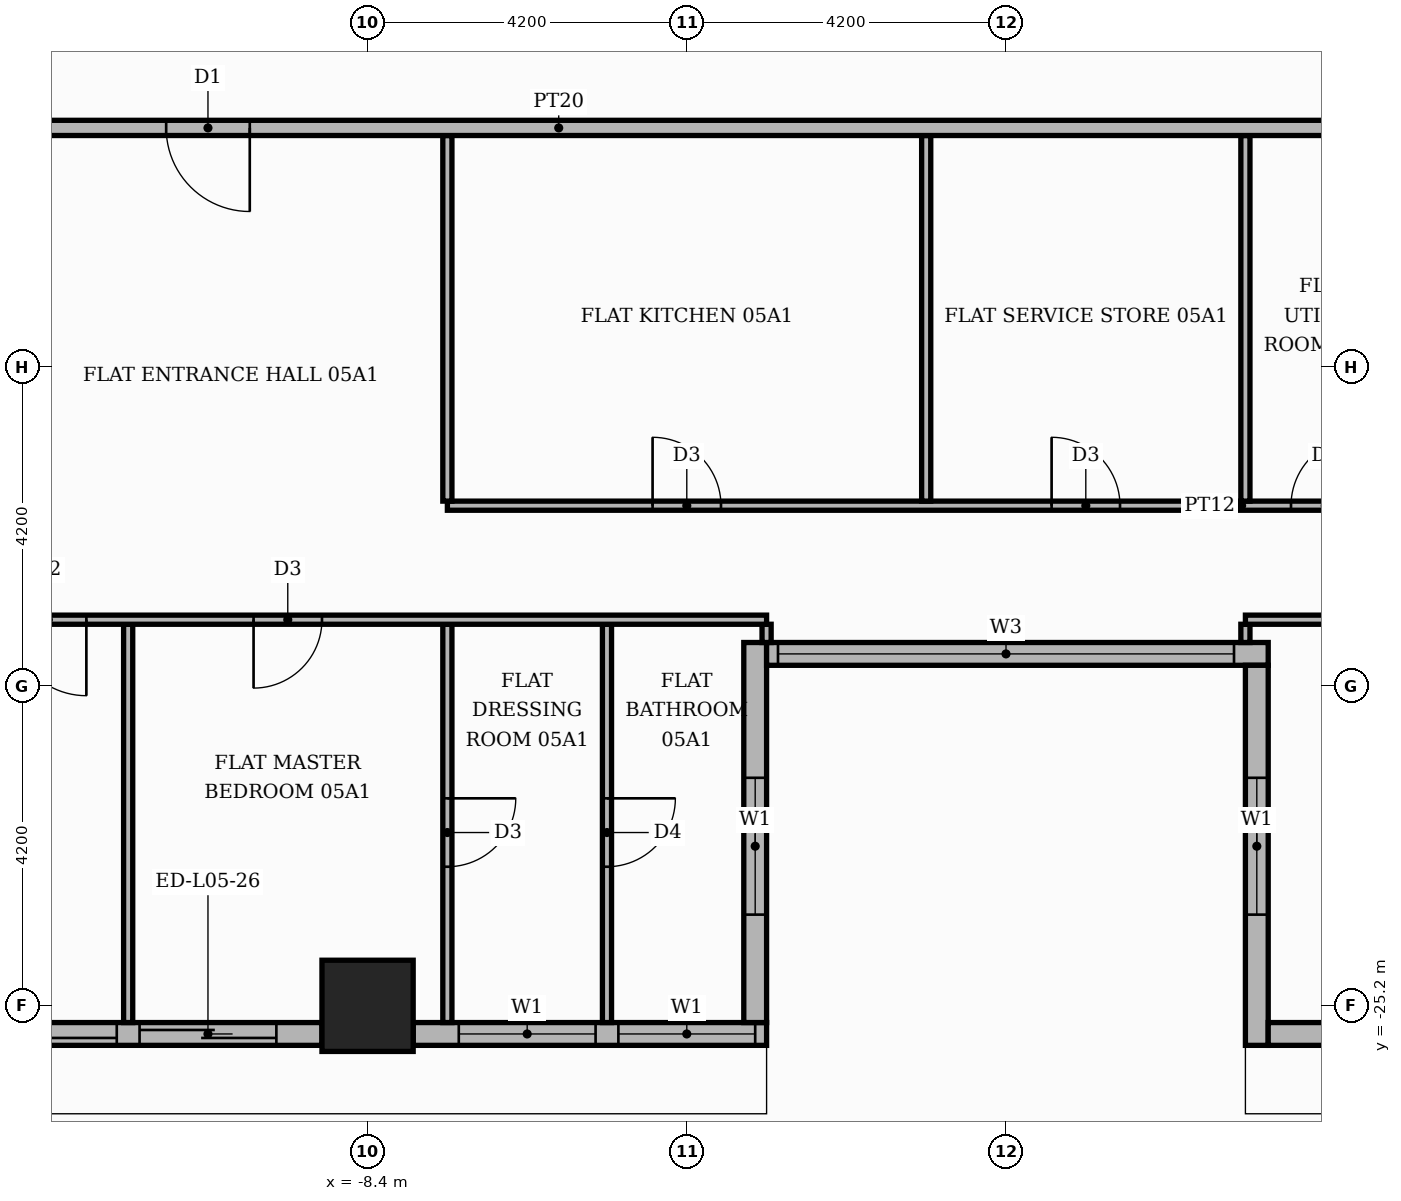
"""IFC4 building model, lengths in metres.
Left out: names, types, materials, properties, quantities, classifications, styles, units other than length and angle.
Written with IfcOpenShell. Run it as: python <this file> out.ifc"""

import sys

from ifc_helpers import new_model, si_unit, direction, frame, frame_2d, origin, origin_2d, place, context, subcontext, project, spatial, rectangle, extrude, element, fill, save


model = new_model("IFC4")
c1 = context("Model", 3, precision=1e-05, world=origin(), true_north=direction((0.0, 1.0)))
c2 = subcontext(c1, "Body", "Model", "MODEL_VIEW")
j1 = project(units=[si_unit("LENGTHUNIT", "METRE"), si_unit("PLANEANGLEUNIT", "RADIAN")], contexts=[c1])
p1 = place(None, origin())
s1 = spatial("IfcSite", under=j1, at=p1, CompositionType="ELEMENT")
p2 = place(p1, origin())
s2 = spatial("IfcBuilding", under=s1, at=p2, CompositionType="ELEMENT")
p3 = place(p2, frame((0.0, 0.0, 27.0)))
s3 = spatial("IfcBuildingStorey", under=s2, at=p3, CompositionType="ELEMENT", Elevation=27.0)
p4 = place(p3, frame((-8.4, -25.2, 0.0), z_axis=(0.0, 0.0, 1.0), x_axis=(1.0, 0.0, 0.0)))
e1 = element("IfcColumn", 1, at=p4, inside=s3, PredefinedType="COLUMN", context=c2, shape_type="SweptSolid", body=[
    extrude(rectangle(XDim=1.2, YDim=1.2, at=origin_2d()), origin(), (0.0, 0.0, 1.0), 3.9),
])
p5 = place(p3, frame((-16.2, -25.57, 0.0), z_axis=(0.0, 0.0, 1.0), x_axis=(1.0, 0.0, 0.0)))
e2 = element("IfcWall", 2, at=p5, inside=s3, PredefinedType="STANDARD", context=c2, shape_type="SweptSolid", body=[
    extrude(rectangle(XDim=7.2, YDim=0.3, at=frame_2d((3.6, 0.0))), origin(), (0.0, 0.0, 1.0), 3.48),
])
p6 = place(p5, frame((0.6, 0.0, 0.0)))
e3 = element("IfcOpeningElement", 3, at=p6, cuts=e2, PredefinedType="OPENING", context=c2, shape_type="SweptSolid", body=[
    extrude(rectangle(XDim=3.9, YDim=2.4, at=frame_2d((1.95, 1.2))), frame((0.0, 0.16, 0.0), z_axis=(0.0, -1.0, 0.0), x_axis=(1.0, 0.0, 0.0)), (0.0, 0.0, 1.0), 0.32),
])
p7 = place(p5, frame((4.8, 0.0, 0.0)))
e4 = element("IfcOpeningElement", 4, at=p7, cuts=e2, PredefinedType="OPENING", context=c2, shape_type="SweptSolid", body=[
    extrude(rectangle(XDim=1.8, YDim=2.4, at=frame_2d((0.9, 1.2))), frame((0.0, 0.16, 0.0), z_axis=(0.0, -1.0, 0.0), x_axis=(1.0, 0.0, 0.0)), (0.0, 0.0, 1.0), 0.32),
])
p8 = place(p3, frame((-7.8, -25.57, 0.0), z_axis=(0.0, 0.0, 1.0), x_axis=(1.0, 0.0, 0.0)))
e5 = element("IfcWall", 5, at=p8, inside=s3, PredefinedType="STANDARD", context=c2, shape_type="SweptSolid", body=[
    extrude(rectangle(XDim=4.65, YDim=0.3, at=frame_2d((2.325, 0.0))), origin(), (0.0, 0.0, 1.0), 3.48),
])
p9 = place(p8, frame((0.6, 0.0, 0.9)))
e6 = element("IfcOpeningElement", 6, at=p9, cuts=e5, PredefinedType="OPENING", context=c2, shape_type="SweptSolid", body=[
    extrude(rectangle(XDim=1.8, YDim=2.1, at=frame_2d((0.9, 1.05))), frame((0.0, 0.16, 0.0), z_axis=(0.0, -1.0, 0.0), x_axis=(1.0, 0.0, 0.0)), (0.0, 0.0, 1.0), 0.32),
])
p10 = place(p8, frame((2.7, 0.0, 0.9)))
e7 = element("IfcOpeningElement", 7, at=p10, cuts=e5, PredefinedType="OPENING", context=c2, shape_type="SweptSolid", body=[
    extrude(rectangle(XDim=1.8, YDim=2.1, at=frame_2d((0.9, 1.05))), frame((0.0, 0.16, 0.0), z_axis=(0.0, -1.0, 0.0), x_axis=(1.0, 0.0, 0.0)), (0.0, 0.0, 1.0), 0.32),
])
p11 = place(p3, frame((-3.3, -25.42, 0.0), z_axis=(0.0, 0.0, 1.0), x_axis=(0.0, 1.0, 0.0)))
e8 = element("IfcWall", 8, at=p11, inside=s3, PredefinedType="STANDARD", context=c2, shape_type="SweptSolid", body=[
    extrude(rectangle(XDim=5.0, YDim=0.3, at=frame_2d((2.5, 0.0))), origin(), (0.0, 0.0, 1.0), 3.48),
])
p12 = place(p11, frame((1.42, 0.0, 0.9)))
e9 = element("IfcOpeningElement", 9, at=p12, cuts=e8, PredefinedType="OPENING", context=c2, shape_type="SweptSolid", body=[
    extrude(rectangle(XDim=1.8, YDim=2.1, at=frame_2d((0.9, 1.05))), frame((0.0, 0.16, 0.0), z_axis=(0.0, -1.0, 0.0), x_axis=(1.0, 0.0, 0.0)), (0.0, 0.0, 1.0), 0.32),
])
p13 = place(p3, frame((-3.15, -20.57, 0.0), z_axis=(0.0, 0.0, 1.0), x_axis=(1.0, 0.0, 0.0)))
e10 = element("IfcWall", 10, at=p13, inside=s3, PredefinedType="STANDARD", context=c2, shape_type="SweptSolid", body=[
    extrude(rectangle(XDim=6.6, YDim=0.3, at=frame_2d((3.3, 0.0))), origin(), (0.0, 0.0, 1.0), 3.48),
])
p14 = place(p13, frame((0.15, 0.0, 0.9)))
e11 = element("IfcOpeningElement", 11, at=p14, cuts=e10, PredefinedType="OPENING", context=c2, shape_type="SweptSolid", body=[
    extrude(rectangle(XDim=6.0, YDim=2.1, at=frame_2d((3.0, 1.05))), frame((0.0, 0.16, 0.0), z_axis=(0.0, -1.0, 0.0), x_axis=(1.0, 0.0, 0.0)), (0.0, 0.0, 1.0), 0.32),
])
p15 = place(p3, frame((3.3, -20.72, 0.0), z_axis=(0.0, 0.0, 1.0), x_axis=(0.0, -1.0, 0.0)))
e12 = element("IfcWall", 12, at=p15, inside=s3, PredefinedType="STANDARD", context=c2, shape_type="SweptSolid", body=[
    extrude(rectangle(XDim=5.0, YDim=0.3, at=frame_2d((2.5, 0.0))), origin(), (0.0, 0.0, 1.0), 3.48),
])
p16 = place(p15, frame((1.48, 0.0, 0.9)))
e13 = element("IfcOpeningElement", 13, at=p16, cuts=e12, PredefinedType="OPENING", context=c2, shape_type="SweptSolid", body=[
    extrude(rectangle(XDim=1.8, YDim=2.1, at=frame_2d((0.9, 1.05))), frame((0.0, 0.16, 0.0), z_axis=(0.0, -1.0, 0.0), x_axis=(1.0, 0.0, 0.0)), (0.0, 0.0, 1.0), 0.32),
])
p17 = place(p3, frame((3.45, -25.57, 0.0), z_axis=(0.0, 0.0, 1.0), x_axis=(1.0, 0.0, 0.0)))
e14 = element("IfcWall", 14, at=p17, inside=s3, PredefinedType="STANDARD", context=c2, shape_type="SweptSolid", body=[
    extrude(rectangle(XDim=4.35, YDim=0.3, at=frame_2d((2.175, 0.0))), origin(), (0.0, 0.0, 1.0), 3.48),
])
p18 = place(p17, frame((1.95, 0.0, 0.9)))
e15 = element("IfcOpeningElement", 15, at=p18, cuts=e14, PredefinedType="OPENING", context=c2, shape_type="SweptSolid", body=[
    extrude(rectangle(XDim=1.8, YDim=2.1, at=frame_2d((0.9, 1.05))), frame((0.0, 0.16, 0.0), z_axis=(0.0, -1.0, 0.0), x_axis=(1.0, 0.0, 0.0)), (0.0, 0.0, 1.0), 0.32),
])
p19 = place(p3, frame((-11.55, -25.42, 0.0), z_axis=(0.0, 0.0, 1.0), x_axis=(0.0, 1.0, 0.0)))
e16 = element("IfcWall", 16, at=p19, inside=s3, PredefinedType="PARTITIONING", context=c2, shape_type="SweptSolid", body=[
    extrude(rectangle(XDim=5.24, YDim=0.12, at=frame_2d((2.62, 0.0))), origin(), (0.0, 0.0, 1.0), 3.48),
])
p20 = place(p3, frame((-7.35, -25.42, 0.0), z_axis=(0.0, 0.0, 1.0), x_axis=(0.0, 1.0, 0.0)))
e17 = element("IfcWall", 17, at=p20, inside=s3, PredefinedType="PARTITIONING", context=c2, shape_type="SweptSolid", body=[
    extrude(rectangle(XDim=5.24, YDim=0.12, at=frame_2d((2.62, 0.0))), origin(), (0.0, 0.0, 1.0), 3.48),
])
p21 = place(p20, frame((2.05, 0.0, 0.0)))
e18 = element("IfcOpeningElement", 18, at=p21, cuts=e17, PredefinedType="OPENING", context=c2, shape_type="SweptSolid", body=[
    extrude(rectangle(XDim=0.9, YDim=2.1, at=frame_2d((0.45, 1.05))), frame((0.0, 0.07, 0.0), z_axis=(0.0, -1.0, 0.0), x_axis=(1.0, 0.0, 0.0)), (0.0, 0.0, 1.0), 0.14),
])
p22 = place(p3, frame((-5.25, -25.42, 0.0), z_axis=(0.0, 0.0, 1.0), x_axis=(0.0, 1.0, 0.0)))
e19 = element("IfcWall", 19, at=p22, inside=s3, PredefinedType="PARTITIONING", context=c2, shape_type="SweptSolid", body=[
    extrude(rectangle(XDim=5.24, YDim=0.12, at=frame_2d((2.62, 0.0))), origin(), (0.0, 0.0, 1.0), 3.48),
])
p23 = place(p22, frame((2.05, 0.0, 0.0)))
e20 = element("IfcOpeningElement", 20, at=p23, cuts=e19, PredefinedType="OPENING", context=c2, shape_type="SweptSolid", body=[
    extrude(rectangle(XDim=0.9, YDim=2.1, at=frame_2d((0.45, 1.05))), frame((0.0, 0.07, 0.0), z_axis=(0.0, -1.0, 0.0), x_axis=(1.0, 0.0, 0.0)), (0.0, 0.0, 1.0), 0.14),
])
for number, where, z_axis, x_axis in (
    (21, (-3.15, -20.42, 0.0), (0.0, 0.0, 1.0), (0.0, 1.0, 0.0)),
    (22, (3.15, -20.42, 0.0), (0.0, 0.0, 1.0), (0.0, 1.0, 0.0)),
):
    element("IfcWall", number, at=place(p3, frame(where, z_axis=z_axis, x_axis=x_axis)), inside=s3, PredefinedType="PARTITIONING", context=c2, shape_type="SweptSolid", body=[
        extrude(rectangle(XDim=0.24, YDim=0.12, at=frame_2d((0.12, 0.0))), origin(), (0.0, 0.0, 1.0), 3.48),
    ])
p24 = place(p3, frame((-17.3, -20.12, 0.0), z_axis=(0.0, 0.0, 1.0), x_axis=(1.0, 0.0, 0.0)))
e23 = element("IfcWall", 23, at=p24, inside=s3, PredefinedType="PARTITIONING", context=c2, shape_type="SweptSolid", body=[
    extrude(rectangle(XDim=14.15, YDim=0.12, at=frame_2d((7.075, 0.0))), origin(), (0.0, 0.0, 1.0), 3.48),
])
p25 = place(p24, frame((4.2, 0.0, 0.0)))
e24 = element("IfcOpeningElement", 24, at=p25, cuts=e23, PredefinedType="OPENING", context=c2, shape_type="SweptSolid", body=[
    extrude(rectangle(XDim=1.0, YDim=2.1, at=frame_2d((0.5, 1.05))), frame((0.0, 0.07, 0.0), z_axis=(0.0, -1.0, 0.0), x_axis=(1.0, 0.0, 0.0)), (0.0, 0.0, 1.0), 0.14),
])
p26 = place(p24, frame((7.4, 0.0, 0.0)))
e25 = element("IfcOpeningElement", 25, at=p26, cuts=e23, PredefinedType="OPENING", context=c2, shape_type="SweptSolid", body=[
    extrude(rectangle(XDim=0.9, YDim=2.1, at=frame_2d((0.45, 1.05))), frame((0.0, 0.07, 0.0), z_axis=(0.0, -1.0, 0.0), x_axis=(1.0, 0.0, 0.0)), (0.0, 0.0, 1.0), 0.14),
])
p27 = place(p3, frame((3.15, -20.12, 0.0), z_axis=(0.0, 0.0, 1.0), x_axis=(1.0, 0.0, 0.0)))
e26 = element("IfcWall", 26, at=p27, inside=s3, PredefinedType="PARTITIONING", context=c2, shape_type="SweptSolid", body=[
    extrude(rectangle(XDim=10.4, YDim=0.12, at=frame_2d((5.2, 0.0))), origin(), (0.0, 0.0, 1.0), 3.48),
])
p28 = place(p27, frame((4.8, 0.0, 0.0)))
e27 = element("IfcOpeningElement", 27, at=p28, cuts=e26, PredefinedType="OPENING", context=c2, shape_type="SweptSolid", body=[
    extrude(rectangle(XDim=0.9, YDim=2.1, at=frame_2d((0.45, 1.05))), frame((0.0, 0.07, 0.0), z_axis=(0.0, -1.0, 0.0), x_axis=(1.0, 0.0, 0.0)), (0.0, 0.0, 1.0), 0.14),
])
p29 = place(p3, frame((-7.35, -18.62, 0.0), z_axis=(0.0, 0.0, 1.0), x_axis=(1.0, 0.0, 0.0)))
e28 = element("IfcWall", 28, at=p29, inside=s3, PredefinedType="PARTITIONING", context=c2, shape_type="SweptSolid", body=[
    extrude(rectangle(XDim=20.9, YDim=0.12, at=frame_2d((10.45, 0.0))), origin(), (0.0, 0.0, 1.0), 3.48),
])
p30 = place(p29, frame((2.7, 0.0, 0.0)))
e29 = element("IfcOpeningElement", 29, at=p30, cuts=e28, PredefinedType="OPENING", context=c2, shape_type="SweptSolid", body=[
    extrude(rectangle(XDim=0.9, YDim=2.1, at=frame_2d((0.45, 1.05))), frame((0.0, 0.07, 0.0), z_axis=(0.0, -1.0, 0.0), x_axis=(1.0, 0.0, 0.0)), (0.0, 0.0, 1.0), 0.14),
])
p31 = place(p29, frame((7.95, 0.0, 0.0)))
e30 = element("IfcOpeningElement", 30, at=p31, cuts=e28, PredefinedType="OPENING", context=c2, shape_type="SweptSolid", body=[
    extrude(rectangle(XDim=0.9, YDim=2.1, at=frame_2d((0.45, 1.05))), frame((0.0, 0.07, 0.0), z_axis=(0.0, -1.0, 0.0), x_axis=(1.0, 0.0, 0.0)), (0.0, 0.0, 1.0), 0.14),
])
p32 = place(p29, frame((11.1, 0.0, 0.0)))
e31 = element("IfcOpeningElement", 31, at=p32, cuts=e28, PredefinedType="OPENING", context=c2, shape_type="SweptSolid", body=[
    extrude(rectangle(XDim=0.9, YDim=2.1, at=frame_2d((0.45, 1.05))), frame((0.0, 0.07, 0.0), z_axis=(0.0, -1.0, 0.0), x_axis=(1.0, 0.0, 0.0)), (0.0, 0.0, 1.0), 0.14),
])
p33 = place(p29, frame((13.275, 0.0, 0.0)))
e32 = element("IfcOpeningElement", 32, at=p33, cuts=e28, PredefinedType="OPENING", context=c2, shape_type="SweptSolid", body=[
    extrude(rectangle(XDim=0.9, YDim=2.1, at=frame_2d((0.45, 1.05))), frame((0.0, 0.07, 0.0), z_axis=(0.0, -1.0, 0.0), x_axis=(1.0, 0.0, 0.0)), (0.0, 0.0, 1.0), 0.14),
])
p34 = place(p29, frame((15.3, 0.0, 0.0)))
e33 = element("IfcOpeningElement", 33, at=p34, cuts=e28, PredefinedType="OPENING", context=c2, shape_type="SweptSolid", body=[
    extrude(rectangle(XDim=0.9, YDim=2.1, at=frame_2d((0.45, 1.05))), frame((0.0, 0.07, 0.0), z_axis=(0.0, -1.0, 0.0), x_axis=(1.0, 0.0, 0.0)), (0.0, 0.0, 1.0), 0.14),
])
p35 = place(p29, frame((18.375, 0.0, 0.0)))
e34 = element("IfcOpeningElement", 34, at=p35, cuts=e28, PredefinedType="OPENING", context=c2, shape_type="SweptSolid", body=[
    extrude(rectangle(XDim=0.9, YDim=2.1, at=frame_2d((0.45, 1.05))), frame((0.0, 0.07, 0.0), z_axis=(0.0, -1.0, 0.0), x_axis=(1.0, 0.0, 0.0)), (0.0, 0.0, 1.0), 0.14),
])
for number, where, z_axis, x_axis in (
    (35, (-7.35, -18.56, 0.0), (0.0, 0.0, 1.0), (0.0, 1.0, 0.0)),
    (36, (-1.05, -18.56, 0.0), (0.0, 0.0, 1.0), (0.0, 1.0, 0.0)),
    (37, (3.15, -18.56, 0.0), (0.0, 0.0, 1.0), (0.0, 1.0, 0.0)),
):
    element("IfcWall", number, at=place(p3, frame(where, z_axis=z_axis, x_axis=x_axis)), inside=s3, PredefinedType="PARTITIONING", context=c2, shape_type="SweptSolid", body=[
        extrude(rectangle(XDim=4.81, YDim=0.12, at=frame_2d((2.405, 0.0))), origin(), (0.0, 0.0, 1.0), 3.48),
    ])
p36 = place(p3, frame((-25.42, -13.65, 0.0), z_axis=(0.0, 0.0, 1.0), x_axis=(1.0, 0.0, 0.0)))
e38 = element("IfcWall", 38, at=p36, inside=s3, PredefinedType="PARTITIONING", context=c2, shape_type="SweptSolid", body=[
    extrude(rectangle(XDim=39.07, YDim=0.2, at=frame_2d((19.535, 0.0))), origin(), (0.0, 0.0, 1.0), 3.48),
])
p37 = place(p36, frame((14.37, 0.0, 0.0)))
e39 = element("IfcOpeningElement", 39, at=p37, cuts=e38, PredefinedType="OPENING", context=c2, shape_type="SweptSolid", body=[
    extrude(rectangle(XDim=1.1, YDim=2.4, at=frame_2d((0.55, 1.2))), frame((0.0, 0.11, 0.0), z_axis=(0.0, -1.0, 0.0), x_axis=(1.0, 0.0, 0.0)), (0.0, 0.0, 1.0), 0.22),
])
p38 = place(p6, origin())
e40 = element("IfcDoor", 40, at=p38, inside=s3, OperationType="SLIDING_TO_LEFT", PredefinedType="DOOR", context=c2, shape_type="SweptSolid", body=[
    extrude(rectangle(XDim=3.9, YDim=2.4, at=frame_2d((1.95, 1.2))), frame((0.0, 0.025, 0.0), z_axis=(0.0, -1.0, 0.0), x_axis=(1.0, 0.0, 0.0)), (0.0, 0.0, 1.0), 0.05),
])
fill(e3, e40)
p39 = place(p7, origin())
e41 = element("IfcDoor", 41, at=p39, inside=s3, OperationType="SLIDING_TO_RIGHT", PredefinedType="DOOR", context=c2, shape_type="SweptSolid", body=[
    extrude(rectangle(XDim=1.8, YDim=2.4, at=frame_2d((0.9, 1.2))), frame((0.0, 0.025, 0.0), z_axis=(0.0, -1.0, 0.0), x_axis=(1.0, 0.0, 0.0)), (0.0, 0.0, 1.0), 0.05),
])
fill(e4, e41)
p40 = place(p9, origin())
e42 = element("IfcWindow", 42, at=p40, inside=s3, PartitioningType="SINGLE_PANEL", PredefinedType="WINDOW", context=c2, shape_type="SweptSolid", body=[
    extrude(rectangle(XDim=1.8, YDim=2.1, at=frame_2d((0.9, 1.05))), frame((0.0, 0.03, 0.0), z_axis=(0.0, -1.0, 0.0), x_axis=(1.0, 0.0, 0.0)), (0.0, 0.0, 1.0), 0.06),
])
fill(e6, e42)
p41 = place(p10, origin())
e43 = element("IfcWindow", 43, at=p41, inside=s3, PartitioningType="SINGLE_PANEL", PredefinedType="WINDOW", context=c2, shape_type="SweptSolid", body=[
    extrude(rectangle(XDim=1.8, YDim=2.1, at=frame_2d((0.9, 1.05))), frame((0.0, 0.03, 0.0), z_axis=(0.0, -1.0, 0.0), x_axis=(1.0, 0.0, 0.0)), (0.0, 0.0, 1.0), 0.06),
])
fill(e7, e43)
p42 = place(p12, origin())
e44 = element("IfcWindow", 44, at=p42, inside=s3, PartitioningType="SINGLE_PANEL", PredefinedType="WINDOW", context=c2, shape_type="SweptSolid", body=[
    extrude(rectangle(XDim=1.8, YDim=2.1, at=frame_2d((0.9, 1.05))), frame((0.0, 0.03, 0.0), z_axis=(0.0, -1.0, 0.0), x_axis=(1.0, 0.0, 0.0)), (0.0, 0.0, 1.0), 0.06),
])
fill(e9, e44)
p43 = place(p14, origin())
e45 = element("IfcWindow", 45, at=p43, inside=s3, PartitioningType="SINGLE_PANEL", PredefinedType="WINDOW", context=c2, shape_type="SweptSolid", body=[
    extrude(rectangle(XDim=6.0, YDim=2.1, at=frame_2d((3.0, 1.05))), frame((0.0, 0.03, 0.0), z_axis=(0.0, -1.0, 0.0), x_axis=(1.0, 0.0, 0.0)), (0.0, 0.0, 1.0), 0.06),
])
fill(e11, e45)
p44 = place(p16, origin())
e46 = element("IfcWindow", 46, at=p44, inside=s3, PartitioningType="SINGLE_PANEL", PredefinedType="WINDOW", context=c2, shape_type="SweptSolid", body=[
    extrude(rectangle(XDim=1.8, YDim=2.1, at=frame_2d((0.9, 1.05))), frame((0.0, 0.03, 0.0), z_axis=(0.0, -1.0, 0.0), x_axis=(1.0, 0.0, 0.0)), (0.0, 0.0, 1.0), 0.06),
])
fill(e13, e46)
p45 = place(p37, frame((1.1, 0.0, 0.0), z_axis=(0.0, 0.0, 1.0), x_axis=(-1.0, 0.0, 0.0)))
e47 = element("IfcDoor", 47, at=p45, inside=s3, OperationType="SINGLE_SWING_RIGHT", PredefinedType="DOOR", context=c2, shape_type="SweptSolid", body=[
    extrude(rectangle(XDim=1.1, YDim=2.4, at=frame_2d((0.55, 1.2))), frame((0.0, 0.025, 0.0), z_axis=(0.0, -1.0, 0.0), x_axis=(1.0, 0.0, 0.0)), (0.0, 0.0, 1.0), 0.05),
])
fill(e39, e47)
p46 = place(p30, origin())
e48 = element("IfcDoor", 48, at=p46, inside=s3, OperationType="SINGLE_SWING_LEFT", PredefinedType="DOOR", context=c2, shape_type="SweptSolid", body=[
    extrude(rectangle(XDim=0.9, YDim=2.1, at=frame_2d((0.45, 1.05))), frame((0.0, 0.025, 0.0), z_axis=(0.0, -1.0, 0.0), x_axis=(1.0, 0.0, 0.0)), (0.0, 0.0, 1.0), 0.05),
])
fill(e29, e48)
p47 = place(p31, origin())
e49 = element("IfcDoor", 49, at=p47, inside=s3, OperationType="SINGLE_SWING_LEFT", PredefinedType="DOOR", context=c2, shape_type="SweptSolid", body=[
    extrude(rectangle(XDim=0.9, YDim=2.1, at=frame_2d((0.45, 1.05))), frame((0.0, 0.025, 0.0), z_axis=(0.0, -1.0, 0.0), x_axis=(1.0, 0.0, 0.0)), (0.0, 0.0, 1.0), 0.05),
])
fill(e30, e49)
p48 = place(p32, origin())
e50 = element("IfcDoor", 50, at=p48, inside=s3, OperationType="SINGLE_SWING_RIGHT", PredefinedType="DOOR", context=c2, shape_type="SweptSolid", body=[
    extrude(rectangle(XDim=0.9, YDim=2.1, at=frame_2d((0.45, 1.05))), frame((0.0, 0.025, 0.0), z_axis=(0.0, -1.0, 0.0), x_axis=(1.0, 0.0, 0.0)), (0.0, 0.0, 1.0), 0.05),
])
fill(e31, e50)
p49 = place(p25, frame((1.0, 0.0, 0.0), z_axis=(0.0, 0.0, 1.0), x_axis=(-1.0, 0.0, 0.0)))
e51 = element("IfcDoor", 51, at=p49, inside=s3, OperationType="SINGLE_SWING_RIGHT", PredefinedType="DOOR", context=c2, shape_type="SweptSolid", body=[
    extrude(rectangle(XDim=1.0, YDim=2.1, at=frame_2d((0.5, 1.05))), frame((0.0, 0.025, 0.0), z_axis=(0.0, -1.0, 0.0), x_axis=(1.0, 0.0, 0.0)), (0.0, 0.0, 1.0), 0.05),
])
fill(e24, e51)
p50 = place(p26, frame((0.9, 0.0, 0.0), z_axis=(0.0, 0.0, 1.0), x_axis=(-1.0, 0.0, 0.0)))
e52 = element("IfcDoor", 52, at=p50, inside=s3, OperationType="SINGLE_SWING_LEFT", PredefinedType="DOOR", context=c2, shape_type="SweptSolid", body=[
    extrude(rectangle(XDim=0.9, YDim=2.1, at=frame_2d((0.45, 1.05))), frame((0.0, 0.025, 0.0), z_axis=(0.0, -1.0, 0.0), x_axis=(1.0, 0.0, 0.0)), (0.0, 0.0, 1.0), 0.05),
])
fill(e25, e52)
p51 = place(p21, frame((0.9, 0.0, 0.0), z_axis=(0.0, 0.0, 1.0), x_axis=(-1.0, 0.0, 0.0)))
e53 = element("IfcDoor", 53, at=p51, inside=s3, OperationType="SINGLE_SWING_RIGHT", PredefinedType="DOOR", context=c2, shape_type="SweptSolid", body=[
    extrude(rectangle(XDim=0.9, YDim=2.1, at=frame_2d((0.45, 1.05))), frame((0.0, 0.025, 0.0), z_axis=(0.0, -1.0, 0.0), x_axis=(1.0, 0.0, 0.0)), (0.0, 0.0, 1.0), 0.05),
])
fill(e18, e53)
p52 = place(p23, frame((0.9, 0.0, 0.0), z_axis=(0.0, 0.0, 1.0), x_axis=(-1.0, 0.0, 0.0)))
e54 = element("IfcDoor", 54, at=p52, inside=s3, OperationType="SINGLE_SWING_RIGHT", PredefinedType="DOOR", context=c2, shape_type="SweptSolid", body=[
    extrude(rectangle(XDim=0.9, YDim=2.1, at=frame_2d((0.45, 1.05))), frame((0.0, 0.025, 0.0), z_axis=(0.0, -1.0, 0.0), x_axis=(1.0, 0.0, 0.0)), (0.0, 0.0, 1.0), 0.05),
])
fill(e20, e54)
save(model, sys.argv[1])
